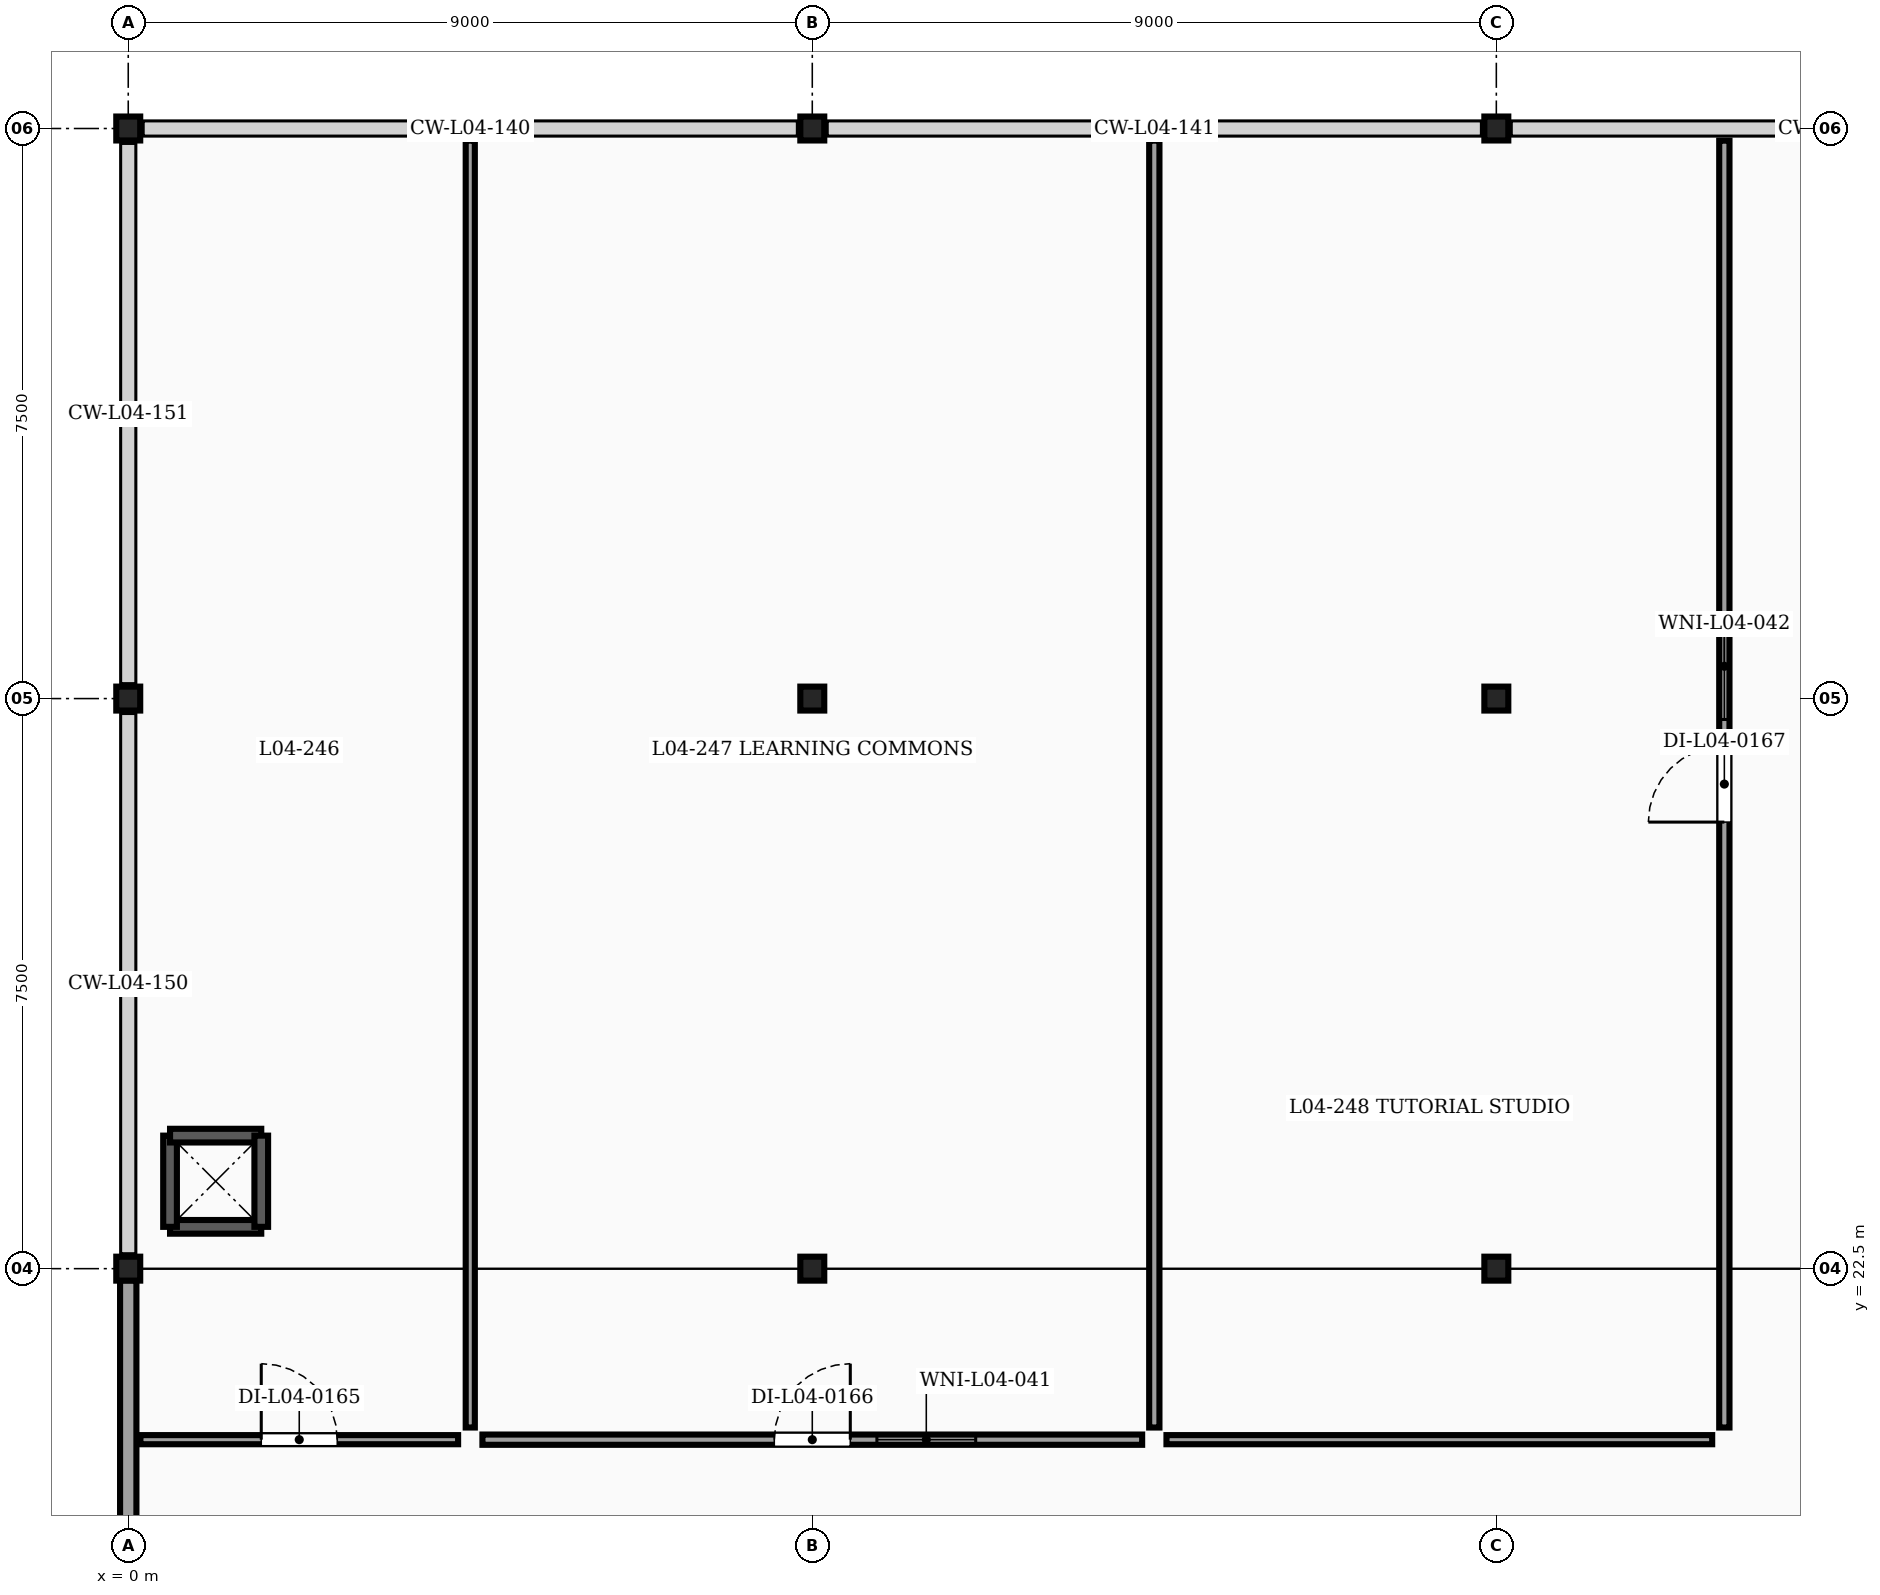
"""IFC4 building model, lengths in metres.
Left out: names, types, materials, properties, quantities, classifications, styles, units other than length and angle.
Written with IfcOpenShell. Run it as: python <this file> out.ifc"""

import sys

from ifc_helpers import new_model, si_unit, direction, frame, frame_2d, origin, origin_2d, place, context, subcontext, project, spatial, rectangle, extrude, element, fill, save


model = new_model("IFC4")
c1 = context("Model", 3, precision=1e-05, world=origin(), true_north=direction((0.0, 1.0)))
c2 = subcontext(c1, "Body", "Model", "MODEL_VIEW")
j1 = project(units=[si_unit("LENGTHUNIT", "METRE"), si_unit("PLANEANGLEUNIT", "RADIAN")], contexts=[c1])
p1 = place(None, origin())
s1 = spatial("IfcSite", under=j1, at=p1, CompositionType="ELEMENT")
p2 = place(p1, origin())
s2 = spatial("IfcBuilding", under=s1, at=p2, CompositionType="ELEMENT")
p3 = place(p2, frame((0.0, 0.0, 16.1)))
s3 = spatial("IfcBuildingStorey", under=s2, at=p3, CompositionType="ELEMENT", Elevation=16.1)
for number, where, z_axis, x_axis in (
    (1, (0.0, 22.5, 0.0), (0.0, 0.0, 1.0), (1.0, 0.0, 0.0)),
    (2, (9.0, 22.5, 0.0), (0.0, 0.0, 1.0), (1.0, 0.0, 0.0)),
    (3, (18.0, 22.5, 0.0), (0.0, 0.0, 1.0), (1.0, 0.0, 0.0)),
    (4, (0.0, 30.0, 0.0), (0.0, 0.0, 1.0), (1.0, 0.0, 0.0)),
    (5, (9.0, 30.0, 0.0), (0.0, 0.0, 1.0), (1.0, 0.0, 0.0)),
    (6, (18.0, 30.0, 0.0), (0.0, 0.0, 1.0), (1.0, 0.0, 0.0)),
    (7, (0.0, 37.5, 0.0), (0.0, 0.0, 1.0), (1.0, 0.0, 0.0)),
    (8, (9.0, 37.5, 0.0), (0.0, 0.0, 1.0), (1.0, 0.0, 0.0)),
    (9, (18.0, 37.5, 0.0), (0.0, 0.0, 1.0), (1.0, 0.0, 0.0)),
):
    element("IfcColumn", number, at=place(p3, frame(where, z_axis=z_axis, x_axis=x_axis)), inside=s3, PredefinedType="COLUMN", context=c2, shape_type="SweptSolid", body=[
        extrude(rectangle(XDim=0.315, YDim=0.315, at=origin_2d()), origin(), (0.0, 0.0, 1.0), 3.65),
    ])
p4 = place(p3, frame((0.0, 15.154, 0.0), z_axis=(0.0, 0.0, 1.0), x_axis=(0.0, 1.0, 0.0)))
e10 = element("IfcWall", 10, at=p4, inside=s3, PredefinedType="SOLIDWALL", context=c2, shape_type="SweptSolid", body=[
    extrude(rectangle(XDim=7.193, YDim=0.215, at=frame_2d((3.596, 0.0))), origin(), (0.0, 0.0, 1.0), 3.057),
])
for number, where, z_axis, x_axis in (
    (11, (1.75, 23.05, 0.0), (0.0, 0.0, 1.0), (-1.0, 0.0, 0.0)),
    (12, (0.55, 23.05, 0.0), (0.0, 0.0, 1.0), (0.0, 1.0, 0.0)),
    (13, (0.55, 24.25, 0.0), (0.0, 0.0, 1.0), (1.0, 0.0, 0.0)),
    (14, (1.75, 24.25, 0.0), (0.0, 0.0, 1.0), (0.0, -1.0, 0.0)),
):
    element("IfcWall", number, at=place(p3, frame(where, z_axis=z_axis, x_axis=x_axis)), inside=s3, PredefinedType="SHEAR", context=c2, shape_type="SweptSolid", body=[
        extrude(rectangle(XDim=1.2, YDim=0.18, at=frame_2d((0.6, 0.0))), origin(), (0.0, 0.0, 1.0), 3.65),
    ])
p5 = place(p3, frame((0.16, 20.25, 0.0), z_axis=(0.0, 0.0, 1.0), x_axis=(1.0, 0.0, 0.0)))
e15 = element("IfcWall", 15, at=p5, inside=s3, PredefinedType="PARTITIONING", context=c2, shape_type="SweptSolid", body=[
    extrude(rectangle(XDim=4.18, YDim=0.12, at=frame_2d((2.09, 0.0))), origin(), (0.0, 0.0, 1.0), 3.65),
])
p6 = place(p5, frame((1.59, 0.0, 0.0)))
e16 = element("IfcOpeningElement", 16, at=p6, cuts=e15, PredefinedType="OPENING", context=c2, shape_type="SweptSolid", body=[
    extrude(rectangle(XDim=1.0, YDim=2.15, at=frame_2d((0.5, 1.075))), frame((0.0, 0.07, 0.0), z_axis=(0.0, -1.0, 0.0), x_axis=(1.0, 0.0, 0.0)), (0.0, 0.0, 1.0), 0.14),
])
p7 = place(p3, frame((4.66, 20.25, 0.0), z_axis=(0.0, 0.0, 1.0), x_axis=(1.0, 0.0, 0.0)))
e17 = element("IfcWall", 17, at=p7, inside=s3, PredefinedType="PARTITIONING", context=c2, shape_type="SweptSolid", body=[
    extrude(rectangle(XDim=8.68, YDim=0.135, at=frame_2d((4.34, 0.0))), origin(), (0.0, 0.0, 1.0), 3.65),
])
p8 = place(p7, frame((3.84, 0.0, 0.0)))
e18 = element("IfcOpeningElement", 18, at=p8, cuts=e17, PredefinedType="OPENING", context=c2, shape_type="SweptSolid", body=[
    extrude(rectangle(XDim=1.0, YDim=2.15, at=frame_2d((0.5, 1.075))), frame((0.0, 0.077, 0.0), z_axis=(0.0, -1.0, 0.0), x_axis=(1.0, 0.0, 0.0)), (0.0, 0.0, 1.0), 0.155),
])
p9 = place(p7, frame((5.19, 0.0, 1.02)))
e19 = element("IfcOpeningElement", 19, at=p9, cuts=e17, PredefinedType="OPENING", context=c2, shape_type="SweptSolid", body=[
    extrude(rectangle(XDim=1.3, YDim=1.18, at=frame_2d((0.65, 0.59))), frame((0.0, 0.077, 0.0), z_axis=(0.0, -1.0, 0.0), x_axis=(1.0, 0.0, 0.0)), (0.0, 0.0, 1.0), 0.155),
])
p10 = place(p3, frame((13.66, 20.25, 0.0), z_axis=(0.0, 0.0, 1.0), x_axis=(1.0, 0.0, 0.0)))
e20 = element("IfcWall", 20, at=p10, inside=s3, PredefinedType="PARTITIONING", context=c2, shape_type="SweptSolid", body=[
    extrude(rectangle(XDim=7.18, YDim=0.12, at=frame_2d((3.59, 0.0))), origin(), (0.0, 0.0, 1.0), 3.65),
])
p11 = place(p3, frame((21.0, 20.41, 0.0), z_axis=(0.0, 0.0, 1.0), x_axis=(0.0, 1.0, 0.0)))
e21 = element("IfcWall", 21, at=p11, inside=s3, PredefinedType="PARTITIONING", context=c2, shape_type="SweptSolid", body=[
    extrude(rectangle(XDim=16.93, YDim=0.135, at=frame_2d((8.465, 0.0))), origin(), (0.0, 0.0, 1.0), 3.342),
])
p12 = place(p11, frame((7.965, 0.0, 0.0)))
e22 = element("IfcOpeningElement", 22, at=p12, cuts=e21, PredefinedType="OPENING", context=c2, shape_type="SweptSolid", body=[
    extrude(rectangle(XDim=1.0, YDim=2.15, at=frame_2d((0.5, 1.075))), frame((0.0, 0.077, 0.0), z_axis=(0.0, -1.0, 0.0), x_axis=(1.0, 0.0, 0.0)), (0.0, 0.0, 1.0), 0.155),
])
p13 = place(p11, frame((9.315, 0.0, 1.02)))
e23 = element("IfcOpeningElement", 23, at=p13, cuts=e21, PredefinedType="OPENING", context=c2, shape_type="SweptSolid", body=[
    extrude(rectangle(XDim=1.4, YDim=1.2, at=frame_2d((0.7, 0.6))), frame((0.0, 0.077, 0.0), z_axis=(0.0, -1.0, 0.0), x_axis=(1.0, 0.0, 0.0)), (0.0, 0.0, 1.0), 0.155),
])
p14 = place(p3, frame((4.5, 20.41, 0.0), z_axis=(0.0, 0.0, 1.0), x_axis=(0.0, 1.0, 0.0)))
e24 = element("IfcWall", 24, at=p14, inside=s3, PredefinedType="PARTITIONING", context=c2, shape_type="SweptSolid", body=[
    extrude(rectangle(XDim=16.93, YDim=0.12, at=frame_2d((8.465, 0.0))), origin(), (0.0, 0.0, 1.0), 3.65),
])
p15 = place(p3, frame((13.5, 20.41, 0.0), z_axis=(0.0, 0.0, 1.0), x_axis=(0.0, 1.0, 0.0)))
e25 = element("IfcWall", 25, at=p15, inside=s3, PredefinedType="PARTITIONING", context=c2, shape_type="SweptSolid", body=[
    extrude(rectangle(XDim=16.93, YDim=0.135, at=frame_2d((8.465, 0.0))), origin(), (0.0, 0.0, 1.0), 3.65),
])
p16 = place(p6, origin())
e26 = element("IfcDoor", 26, at=p16, inside=s3, OperationType="SINGLE_SWING_LEFT", PredefinedType="DOOR", context=c2, shape_type="SweptSolid", body=[
    extrude(rectangle(XDim=1.0, YDim=2.15, at=frame_2d((0.5, 1.075))), frame((0.0, 0.025, 0.0), z_axis=(0.0, -1.0, 0.0), x_axis=(1.0, 0.0, 0.0)), (0.0, 0.0, 1.0), 0.05),
])
fill(e16, e26)
p17 = place(p8, origin())
e27 = element("IfcDoor", 27, at=p17, inside=s3, OperationType="SINGLE_SWING_RIGHT", PredefinedType="DOOR", context=c2, shape_type="SweptSolid", body=[
    extrude(rectangle(XDim=1.0, YDim=2.15, at=frame_2d((0.5, 1.075))), frame((0.0, 0.025, 0.0), z_axis=(0.0, -1.0, 0.0), x_axis=(1.0, 0.0, 0.0)), (0.0, 0.0, 1.0), 0.05),
])
fill(e18, e27)
p18 = place(p9, origin())
e28 = element("IfcWindow", 28, at=p18, inside=s3, PartitioningType="DOUBLE_PANEL_VERTICAL", PredefinedType="WINDOW", context=c2, shape_type="SweptSolid", body=[
    extrude(rectangle(XDim=1.3, YDim=1.18, at=frame_2d((0.65, 0.59))), frame((0.0, 0.03, 0.0), z_axis=(0.0, -1.0, 0.0), x_axis=(1.0, 0.0, 0.0)), (0.0, 0.0, 1.0), 0.06),
])
fill(e19, e28)
p19 = place(p12, origin())
e29 = element("IfcDoor", 29, at=p19, inside=s3, OperationType="SINGLE_SWING_LEFT", PredefinedType="DOOR", context=c2, shape_type="SweptSolid", body=[
    extrude(rectangle(XDim=1.0, YDim=2.15, at=frame_2d((0.5, 1.075))), frame((0.0, 0.025, 0.0), z_axis=(0.0, -1.0, 0.0), x_axis=(1.0, 0.0, 0.0)), (0.0, 0.0, 1.0), 0.05),
])
fill(e22, e29)
p20 = place(p13, origin())
e30 = element("IfcWindow", 30, at=p20, inside=s3, PartitioningType="DOUBLE_PANEL_VERTICAL", PredefinedType="WINDOW", context=c2, shape_type="SweptSolid", body=[
    extrude(rectangle(XDim=1.4, YDim=1.2, at=frame_2d((0.7, 0.6))), frame((0.0, 0.03, 0.0), z_axis=(0.0, -1.0, 0.0), x_axis=(1.0, 0.0, 0.0)), (0.0, 0.0, 1.0), 0.06),
])
fill(e23, e30)
save(model, sys.argv[1])
